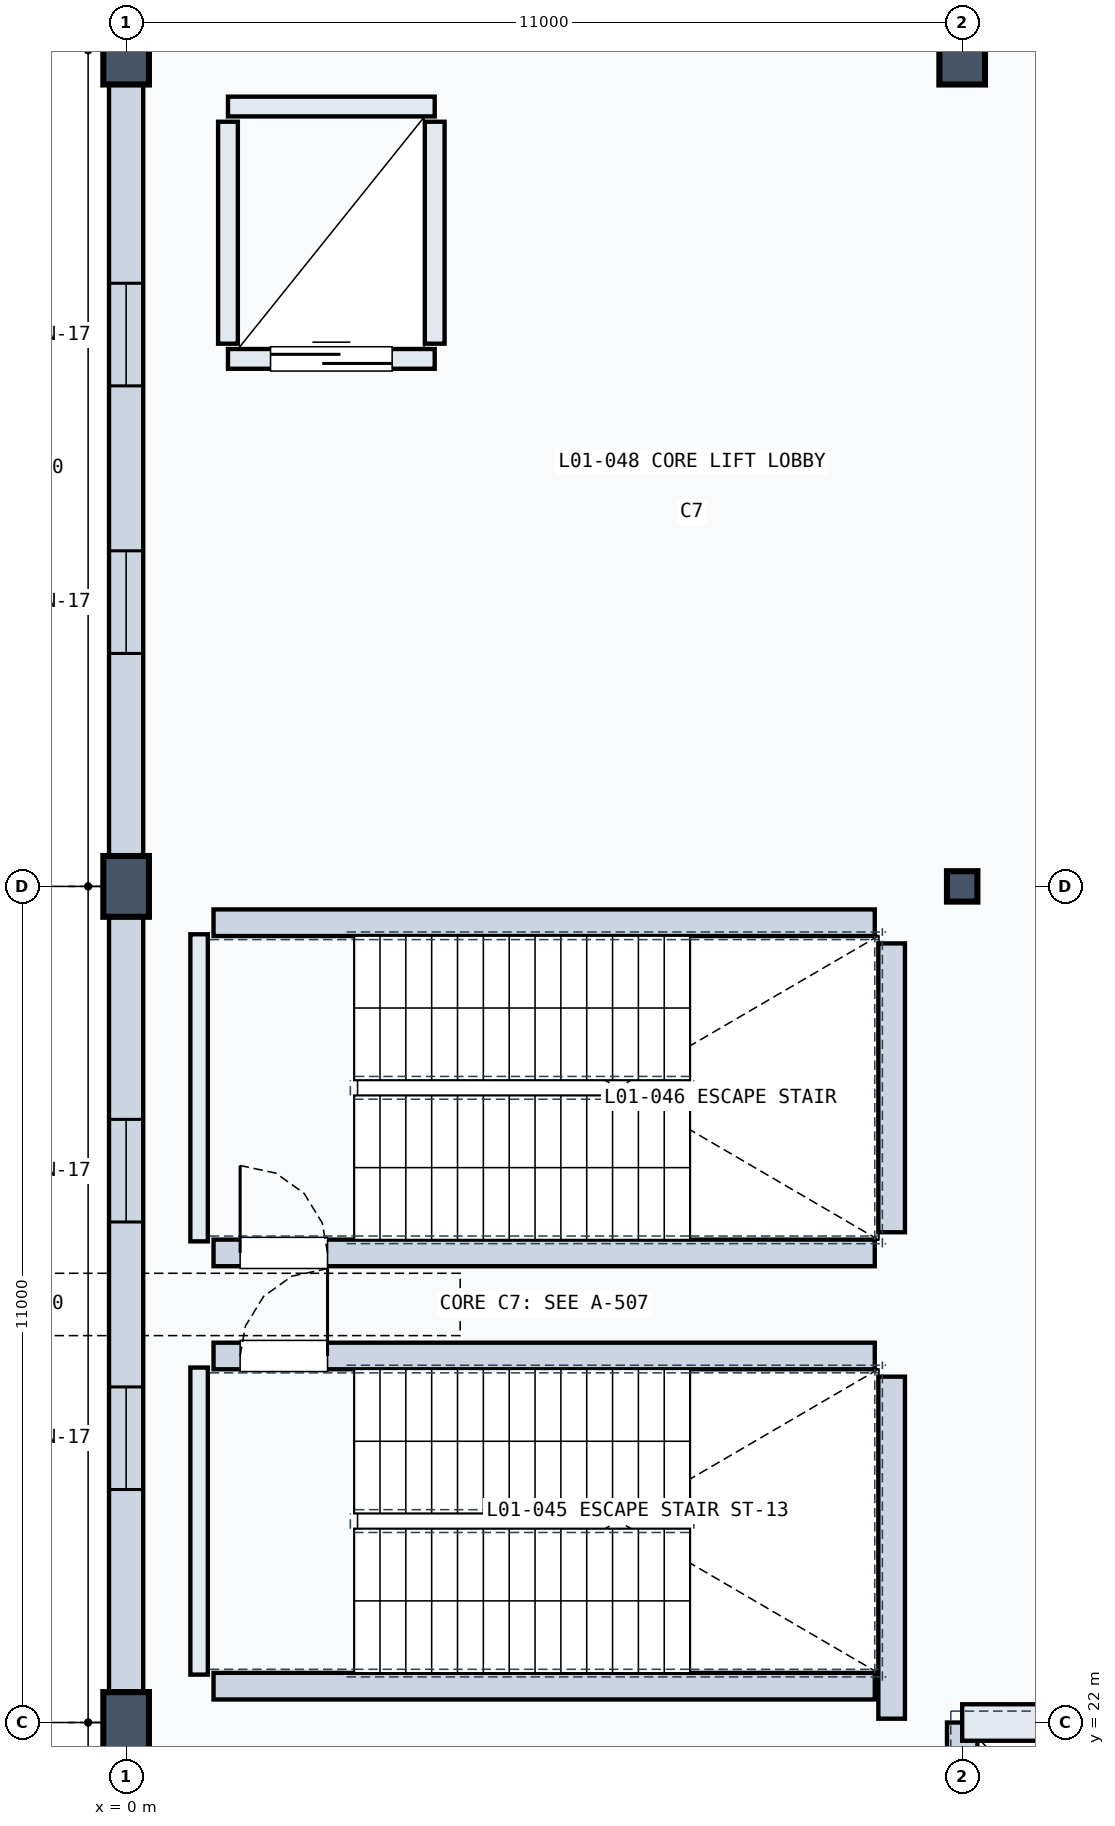
"""IFC4 building model, lengths in metres.
Left out: names, types, materials, properties, quantities, classifications, styles, units other than length and angle.
Written with IfcOpenShell. Run it as: python <this file> out.ifc"""

import sys

from ifc_helpers import new_model, si_unit, direction, frame, frame_2d, origin, origin_2d, place, context, subcontext, project, spatial, rectangle, hollow_rectangle, extrude, element, fill, save


model = new_model("IFC4")
c1 = context("Model", 3, precision=1e-05, world=origin(), true_north=direction((0.0, 1.0)))
c2 = subcontext(c1, "Body", "Model", "MODEL_VIEW")
j1 = project(units=[si_unit("LENGTHUNIT", "METRE"), si_unit("PLANEANGLEUNIT", "RADIAN")], contexts=[c1])
p1 = place(None, origin())
s1 = spatial("IfcSite", under=j1, at=p1, CompositionType="ELEMENT")
p2 = place(p1, origin())
s2 = spatial("IfcBuilding", under=s1, at=p2, CompositionType="ELEMENT")
p3 = place(p2, frame((0.0, 0.0, 5.4)))
s3 = spatial("IfcBuildingStorey", under=s2, at=p3, CompositionType="ELEMENT", Elevation=5.4)
for number, where, z_axis, x_axis in (
    (1, (0.0, 22.0, 0.0), (0.0, 0.0, 1.0), (1.0, 0.0, 0.0)),
    (2, (0.0, 33.0, 0.0), (0.0, 0.0, 1.0), (1.0, 0.0, 0.0)),
):
    element("IfcColumn", number, at=place(p3, frame(where, z_axis=z_axis, x_axis=x_axis)), inside=s3, PredefinedType="COLUMN", context=c2, shape_type="SweptSolid", body=[
        extrude(rectangle(XDim=0.6, YDim=0.8, at=origin_2d()), origin(), (0.0, 0.0, 1.0), 4.8),
    ])
p4 = place(p3, frame((0.0, 44.0, 0.0), z_axis=(0.0, 0.0, 1.0), x_axis=(1.0, 0.0, 0.0)))
e3 = element("IfcColumn", 3, at=p4, inside=s3, PredefinedType="COLUMN", context=c2, shape_type="SweptSolid", body=[
    extrude(rectangle(XDim=0.6, YDim=0.9, at=origin_2d()), origin(), (0.0, 0.0, 1.0), 4.8),
])
p5 = place(p3, frame((11.0, 33.0, 0.0), z_axis=(0.0, 0.0, 1.0), x_axis=(1.0, 0.0, 0.0)))
e4 = element("IfcColumn", 4, at=p5, inside=s3, PredefinedType="COLUMN", context=c2, shape_type="SweptSolid", body=[
    extrude(hollow_rectangle(XDim=0.4, YDim=0.4, WallThickness=0.02, at=origin_2d()), origin(), (0.0, 0.0, 1.0), 4.8),
])
p6 = place(p3, frame((11.0, 44.0, 0.0), z_axis=(0.0, 0.0, 1.0), x_axis=(1.0, 0.0, 0.0)))
e5 = element("IfcColumn", 5, at=p6, inside=s3, PredefinedType="COLUMN", context=c2, shape_type="SweptSolid", body=[
    extrude(rectangle(XDim=0.6, YDim=0.9, at=origin_2d()), origin(), (0.0, 0.0, 1.0), 4.8),
])
p7 = place(p3, frame((0.0, 11.22, 0.0), z_axis=(0.0, 0.0, 1.0), x_axis=(0.0, 1.0, 0.0)))
e6 = element("IfcWall", 6, at=p7, inside=s3, PredefinedType="SOLIDWALL", context=c2, shape_type="SweptSolid", body=[
    extrude(rectangle(XDim=10.56, YDim=0.45, at=frame_2d((5.28, 0.0))), origin(), (0.0, 0.0, 1.0), 3.69),
])
p8 = place(p7, frame((2.845, 0.0, 0.8)))
e7 = element("IfcOpeningElement", 7, at=p8, cuts=e6, PredefinedType="OPENING", context=c2, shape_type="SweptSolid", body=[
    extrude(rectangle(XDim=1.35, YDim=2.1, at=frame_2d((0.675, 1.05))), frame((0.0, 0.235, 0.0), z_axis=(0.0, -1.0, 0.0), x_axis=(1.0, 0.0, 0.0)), (0.0, 0.0, 1.0), 0.47),
])
p9 = place(p7, frame((6.365, 0.0, 0.8)))
e8 = element("IfcOpeningElement", 8, at=p9, cuts=e6, PredefinedType="OPENING", context=c2, shape_type="SweptSolid", body=[
    extrude(rectangle(XDim=1.35, YDim=2.1, at=frame_2d((0.675, 1.05))), frame((0.0, 0.235, 0.0), z_axis=(0.0, -1.0, 0.0), x_axis=(1.0, 0.0, 0.0)), (0.0, 0.0, 1.0), 0.47),
])
p10 = place(p3, frame((11.0, 11.22, 0.0), z_axis=(0.0, 0.0, 1.0), x_axis=(0.0, 1.0, 0.0)))
e9 = element("IfcWall", 9, at=p10, inside=s3, PredefinedType="SOLIDWALL", context=c2, shape_type="SweptSolid", body=[
    extrude(rectangle(XDim=10.78, YDim=0.4, at=frame_2d((5.39, 0.0))), origin(), (0.0, 0.0, 1.0), 3.69),
])
p11 = place(p10, frame((2.918, 0.0, 0.8)))
e10 = element("IfcOpeningElement", 10, at=p11, cuts=e9, PredefinedType="OPENING", context=c2, shape_type="SweptSolid", body=[
    extrude(rectangle(XDim=1.35, YDim=2.1, at=frame_2d((0.675, 1.05))), frame((0.0, 0.21, 0.0), z_axis=(0.0, -1.0, 0.0), x_axis=(1.0, 0.0, 0.0)), (0.0, 0.0, 1.0), 0.42),
])
p12 = place(p10, frame((6.512, 0.0, 0.8)))
e11 = element("IfcOpeningElement", 11, at=p12, cuts=e9, PredefinedType="OPENING", context=c2, shape_type="SweptSolid", body=[
    extrude(rectangle(XDim=1.35, YDim=2.1, at=frame_2d((0.675, 1.05))), frame((0.0, 0.21, 0.0), z_axis=(0.0, -1.0, 0.0), x_axis=(1.0, 0.0, 0.0)), (0.0, 0.0, 1.0), 0.42),
])
p13 = place(p3, frame((0.0, 22.22, 0.0), z_axis=(0.0, 0.0, 1.0), x_axis=(0.0, 1.0, 0.0)))
e12 = element("IfcWall", 12, at=p13, inside=s3, PredefinedType="SOLIDWALL", context=c2, shape_type="SweptSolid", body=[
    extrude(rectangle(XDim=10.56, YDim=0.45, at=frame_2d((5.28, 0.0))), origin(), (0.0, 0.0, 1.0), 3.778),
])
p14 = place(p13, frame((2.845, 0.0, 0.8)))
e13 = element("IfcOpeningElement", 13, at=p14, cuts=e12, PredefinedType="OPENING", context=c2, shape_type="SweptSolid", body=[
    extrude(rectangle(XDim=1.35, YDim=2.1, at=frame_2d((0.675, 1.05))), frame((0.0, 0.235, 0.0), z_axis=(0.0, -1.0, 0.0), x_axis=(1.0, 0.0, 0.0)), (0.0, 0.0, 1.0), 0.47),
])
p15 = place(p13, frame((6.365, 0.0, 0.8)))
e14 = element("IfcOpeningElement", 14, at=p15, cuts=e12, PredefinedType="OPENING", context=c2, shape_type="SweptSolid", body=[
    extrude(rectangle(XDim=1.35, YDim=2.1, at=frame_2d((0.675, 1.05))), frame((0.0, 0.235, 0.0), z_axis=(0.0, -1.0, 0.0), x_axis=(1.0, 0.0, 0.0)), (0.0, 0.0, 1.0), 0.47),
])
p16 = place(p3, frame((0.0, 33.22, 0.0), z_axis=(0.0, 0.0, 1.0), x_axis=(0.0, 1.0, 0.0)))
e15 = element("IfcWall", 15, at=p16, inside=s3, PredefinedType="SOLIDWALL", context=c2, shape_type="SweptSolid", body=[
    extrude(rectangle(XDim=10.56, YDim=0.45, at=frame_2d((5.28, 0.0))), origin(), (0.0, 0.0, 1.0), 3.778),
])
p17 = place(p16, frame((2.845, 0.0, 0.8)))
e16 = element("IfcOpeningElement", 16, at=p17, cuts=e15, PredefinedType="OPENING", context=c2, shape_type="SweptSolid", body=[
    extrude(rectangle(XDim=1.35, YDim=2.1, at=frame_2d((0.675, 1.05))), frame((0.0, 0.235, 0.0), z_axis=(0.0, -1.0, 0.0), x_axis=(1.0, 0.0, 0.0)), (0.0, 0.0, 1.0), 0.47),
])
p18 = place(p16, frame((6.365, 0.0, 0.8)))
e17 = element("IfcOpeningElement", 17, at=p18, cuts=e15, PredefinedType="OPENING", context=c2, shape_type="SweptSolid", body=[
    extrude(rectangle(XDim=1.35, YDim=2.1, at=frame_2d((0.675, 1.05))), frame((0.0, 0.235, 0.0), z_axis=(0.0, -1.0, 0.0), x_axis=(1.0, 0.0, 0.0)), (0.0, 0.0, 1.0), 0.47),
])
p19 = place(p3, frame((11.0, 22.0, 0.0), z_axis=(0.0, 0.0, 1.0), x_axis=(1.0, 0.0, 0.0)))
e18 = element("IfcWall", 18, at=p19, inside=s3, PredefinedType="SOLIDWALL", context=c2, shape_type="SweptSolid", body=[
    extrude(rectangle(XDim=10.78, YDim=0.48, at=frame_2d((5.39, 0.0))), origin(), (0.0, 0.0, 1.0), 3.778),
])
p20 = place(p19, frame((1.945, 0.0, 0.85)))
e19 = element("IfcOpeningElement", 19, at=p20, cuts=e18, PredefinedType="OPENING", context=c2, shape_type="SweptSolid", body=[
    extrude(rectangle(XDim=1.5, YDim=2.1, at=frame_2d((0.75, 1.05))), frame((0.0, 0.25, 0.0), z_axis=(0.0, -1.0, 0.0), x_axis=(1.0, 0.0, 0.0)), (0.0, 0.0, 1.0), 0.5),
])
p21 = place(p19, frame((4.64, 0.0, 0.85)))
e20 = element("IfcOpeningElement", 20, at=p21, cuts=e18, PredefinedType="OPENING", context=c2, shape_type="SweptSolid", body=[
    extrude(rectangle(XDim=1.5, YDim=2.1, at=frame_2d((0.75, 1.05))), frame((0.0, 0.25, 0.0), z_axis=(0.0, -1.0, 0.0), x_axis=(1.0, 0.0, 0.0)), (0.0, 0.0, 1.0), 0.5),
])
p22 = place(p19, frame((7.335, 0.0, 0.85)))
e21 = element("IfcOpeningElement", 21, at=p22, cuts=e18, PredefinedType="OPENING", context=c2, shape_type="SweptSolid", body=[
    extrude(rectangle(XDim=1.5, YDim=2.1, at=frame_2d((0.75, 1.05))), frame((0.0, 0.25, 0.0), z_axis=(0.0, -1.0, 0.0), x_axis=(1.0, 0.0, 0.0)), (0.0, 0.0, 1.0), 0.5),
])
p23 = place(p3, frame((0.96, 22.63, 0.0), z_axis=(0.0, 0.0, 1.0), x_axis=(0.0, 1.0, 0.0)))
e22 = element("IfcWall", 22, at=p23, inside=s3, PredefinedType="SOLIDWALL", context=c2, shape_type="SweptSolid", body=[
    extrude(rectangle(XDim=4.04, YDim=0.23, at=frame_2d((2.02, 0.0))), origin(), (0.0, 0.0, 1.0), 4.46),
])
p24 = place(p3, frame((10.072, 22.05, 0.0), z_axis=(0.0, 0.0, 1.0), x_axis=(0.0, 1.0, 0.0)))
e23 = element("IfcWall", 23, at=p24, inside=s3, PredefinedType="SOLIDWALL", context=c2, shape_type="SweptSolid", body=[
    extrude(rectangle(XDim=4.5, YDim=0.35, at=frame_2d((2.25, 0.0))), origin(), (0.0, 0.0, 1.0), 4.46),
])
p25 = place(p3, frame((1.15, 22.478, 0.0), z_axis=(0.0, 0.0, 1.0), x_axis=(1.0, 0.0, 0.0)))
e24 = element("IfcWall", 24, at=p25, inside=s3, PredefinedType="SOLIDWALL", context=c2, shape_type="SweptSolid", body=[
    extrude(rectangle(XDim=8.7, YDim=0.35, at=frame_2d((4.35, 0.0))), origin(), (0.0, 0.0, 1.0), 4.46),
])
p26 = place(p3, frame((1.15, 26.822, 0.0), z_axis=(0.0, 0.0, 1.0), x_axis=(1.0, 0.0, 0.0)))
e25 = element("IfcWall", 25, at=p26, inside=s3, PredefinedType="SOLIDWALL", context=c2, shape_type="SweptSolid", body=[
    extrude(rectangle(XDim=8.7, YDim=0.35, at=frame_2d((4.35, 0.0))), origin(), (0.0, 0.0, 1.0), 4.46),
])
p27 = place(p26, frame((0.35, 0.0, 0.0)))
e26 = element("IfcOpeningElement", 26, at=p27, cuts=e25, PredefinedType="OPENING", context=c2, shape_type="SweptSolid", body=[
    extrude(rectangle(XDim=1.15, YDim=2.2, at=frame_2d((0.575, 1.1))), frame((0.0, 0.185, 0.0), z_axis=(0.0, -1.0, 0.0), x_axis=(1.0, 0.0, 0.0)), (0.0, 0.0, 1.0), 0.37),
])
p28 = place(p3, frame((0.96, 28.33, 0.0), z_axis=(0.0, 0.0, 1.0), x_axis=(0.0, 1.0, 0.0)))
e27 = element("IfcWall", 27, at=p28, inside=s3, PredefinedType="SOLIDWALL", context=c2, shape_type="SweptSolid", body=[
    extrude(rectangle(XDim=4.04, YDim=0.23, at=frame_2d((2.02, 0.0))), origin(), (0.0, 0.0, 1.0), 4.46),
])
p29 = place(p3, frame((10.072, 28.45, 0.0), z_axis=(0.0, 0.0, 1.0), x_axis=(0.0, 1.0, 0.0)))
e28 = element("IfcWall", 28, at=p29, inside=s3, PredefinedType="SOLIDWALL", context=c2, shape_type="SweptSolid", body=[
    extrude(rectangle(XDim=3.8, YDim=0.35, at=frame_2d((1.9, 0.0))), origin(), (0.0, 0.0, 1.0), 4.46),
])
p30 = place(p3, frame((1.15, 28.178, 0.0), z_axis=(0.0, 0.0, 1.0), x_axis=(1.0, 0.0, 0.0)))
e29 = element("IfcWall", 29, at=p30, inside=s3, PredefinedType="SOLIDWALL", context=c2, shape_type="SweptSolid", body=[
    extrude(rectangle(XDim=8.7, YDim=0.35, at=frame_2d((4.35, 0.0))), origin(), (0.0, 0.0, 1.0), 4.46),
])
p31 = place(p30, frame((0.35, 0.0, 0.0)))
e30 = element("IfcOpeningElement", 30, at=p31, cuts=e29, PredefinedType="OPENING", context=c2, shape_type="SweptSolid", body=[
    extrude(rectangle(XDim=1.15, YDim=2.2, at=frame_2d((0.575, 1.1))), frame((0.0, 0.185, 0.0), z_axis=(0.0, -1.0, 0.0), x_axis=(1.0, 0.0, 0.0)), (0.0, 0.0, 1.0), 0.37),
])
p32 = place(p3, frame((1.15, 32.522, 0.0), z_axis=(0.0, 0.0, 1.0), x_axis=(1.0, 0.0, 0.0)))
e31 = element("IfcWall", 31, at=p32, inside=s3, PredefinedType="SOLIDWALL", context=c2, shape_type="SweptSolid", body=[
    extrude(rectangle(XDim=8.7, YDim=0.35, at=frame_2d((4.35, 0.0))), origin(), (0.0, 0.0, 1.0), 4.46),
])
p33 = place(p3, frame((1.34, 39.94, 0.0), z_axis=(0.0, 0.0, 1.0), x_axis=(1.0, 0.0, 0.0)))
e32 = element("IfcWall", 32, at=p33, inside=s3, PredefinedType="SOLIDWALL", context=c2, shape_type="SweptSolid", body=[
    extrude(rectangle(XDim=2.72, YDim=0.26, at=frame_2d((1.36, 0.0))), origin(), (0.0, 0.0, 1.0), 4.46),
])
p34 = place(p33, frame((0.56, 0.0, 0.0)))
e33 = element("IfcOpeningElement", 33, at=p34, cuts=e32, PredefinedType="OPENING", context=c2, shape_type="SweptSolid", body=[
    extrude(rectangle(XDim=1.6, YDim=2.35, at=frame_2d((0.8, 1.175))), frame((0.0, 0.14, 0.0), z_axis=(0.0, -1.0, 0.0), x_axis=(1.0, 0.0, 0.0)), (0.0, 0.0, 1.0), 0.28),
])
p35 = place(p3, frame((1.34, 43.26, 0.0), z_axis=(0.0, 0.0, 1.0), x_axis=(1.0, 0.0, 0.0)))
e34 = element("IfcWall", 34, at=p35, inside=s3, PredefinedType="SOLIDWALL", context=c2, shape_type="SweptSolid", body=[
    extrude(rectangle(XDim=2.72, YDim=0.26, at=frame_2d((1.36, 0.0))), origin(), (0.0, 0.0, 1.0), 4.46),
])
for number, where, z_axis, x_axis in (
    (35, (1.34, 40.14, 0.0), (0.0, 0.0, 1.0), (0.0, 1.0, 0.0)),
    (36, (4.06, 40.14, 0.0), (0.0, 0.0, 1.0), (0.0, 1.0, 0.0)),
):
    element("IfcWall", number, at=place(p3, frame(where, z_axis=z_axis, x_axis=x_axis)), inside=s3, PredefinedType="SOLIDWALL", context=c2, shape_type="SweptSolid", body=[
        extrude(rectangle(XDim=2.92, YDim=0.26, at=frame_2d((1.46, 0.0))), origin(), (0.0, 0.0, 1.0), 4.46),
    ])
p36 = place(p14, origin())
e37 = element("IfcWindow", 37, at=p36, inside=s3, PartitioningType="SINGLE_PANEL", PredefinedType="WINDOW", context=c2, shape_type="SweptSolid", body=[
    extrude(rectangle(XDim=1.35, YDim=2.1, at=frame_2d((0.675, 1.05))), frame((0.0, 0.03, 0.0), z_axis=(0.0, -1.0, 0.0), x_axis=(1.0, 0.0, 0.0)), (0.0, 0.0, 1.0), 0.06),
])
fill(e13, e37)
p37 = place(p15, origin())
e38 = element("IfcWindow", 38, at=p37, inside=s3, PartitioningType="SINGLE_PANEL", PredefinedType="WINDOW", context=c2, shape_type="SweptSolid", body=[
    extrude(rectangle(XDim=1.35, YDim=2.1, at=frame_2d((0.675, 1.05))), frame((0.0, 0.03, 0.0), z_axis=(0.0, -1.0, 0.0), x_axis=(1.0, 0.0, 0.0)), (0.0, 0.0, 1.0), 0.06),
])
fill(e14, e38)
p38 = place(p17, origin())
e39 = element("IfcWindow", 39, at=p38, inside=s3, PartitioningType="SINGLE_PANEL", PredefinedType="WINDOW", context=c2, shape_type="SweptSolid", body=[
    extrude(rectangle(XDim=1.35, YDim=2.1, at=frame_2d((0.675, 1.05))), frame((0.0, 0.03, 0.0), z_axis=(0.0, -1.0, 0.0), x_axis=(1.0, 0.0, 0.0)), (0.0, 0.0, 1.0), 0.06),
])
fill(e16, e39)
p39 = place(p18, origin())
e40 = element("IfcWindow", 40, at=p39, inside=s3, PartitioningType="SINGLE_PANEL", PredefinedType="WINDOW", context=c2, shape_type="SweptSolid", body=[
    extrude(rectangle(XDim=1.35, YDim=2.1, at=frame_2d((0.675, 1.05))), frame((0.0, 0.03, 0.0), z_axis=(0.0, -1.0, 0.0), x_axis=(1.0, 0.0, 0.0)), (0.0, 0.0, 1.0), 0.06),
])
fill(e17, e40)
p40 = place(p27, origin())
e41 = element("IfcDoor", 41, at=p40, inside=s3, OperationType="SINGLE_SWING_RIGHT", PredefinedType="DOOR", context=c2, shape_type="SweptSolid", body=[
    extrude(rectangle(XDim=1.15, YDim=2.2, at=frame_2d((0.575, 1.1))), frame((0.0, 0.025, 0.0), z_axis=(0.0, -1.0, 0.0), x_axis=(1.0, 0.0, 0.0)), (0.0, 0.0, 1.0), 0.05),
])
fill(e26, e41)
p41 = place(p31, origin())
e42 = element("IfcDoor", 42, at=p41, inside=s3, OperationType="SINGLE_SWING_LEFT", PredefinedType="DOOR", context=c2, shape_type="SweptSolid", body=[
    extrude(rectangle(XDim=1.15, YDim=2.2, at=frame_2d((0.575, 1.1))), frame((0.0, 0.025, 0.0), z_axis=(0.0, -1.0, 0.0), x_axis=(1.0, 0.0, 0.0)), (0.0, 0.0, 1.0), 0.05),
])
fill(e30, e42)
p42 = place(p34, origin())
e43 = element("IfcDoor", 43, at=p42, inside=s3, OperationType="DOUBLE_DOOR_SLIDING", PredefinedType="DOOR", context=c2, shape_type="SweptSolid", body=[
    extrude(rectangle(XDim=1.6, YDim=2.35, at=frame_2d((0.8, 1.175))), frame((0.0, 0.025, 0.0), z_axis=(0.0, -1.0, 0.0), x_axis=(1.0, 0.0, 0.0)), (0.0, 0.0, 1.0), 0.05),
])
fill(e33, e43)
save(model, sys.argv[1])
